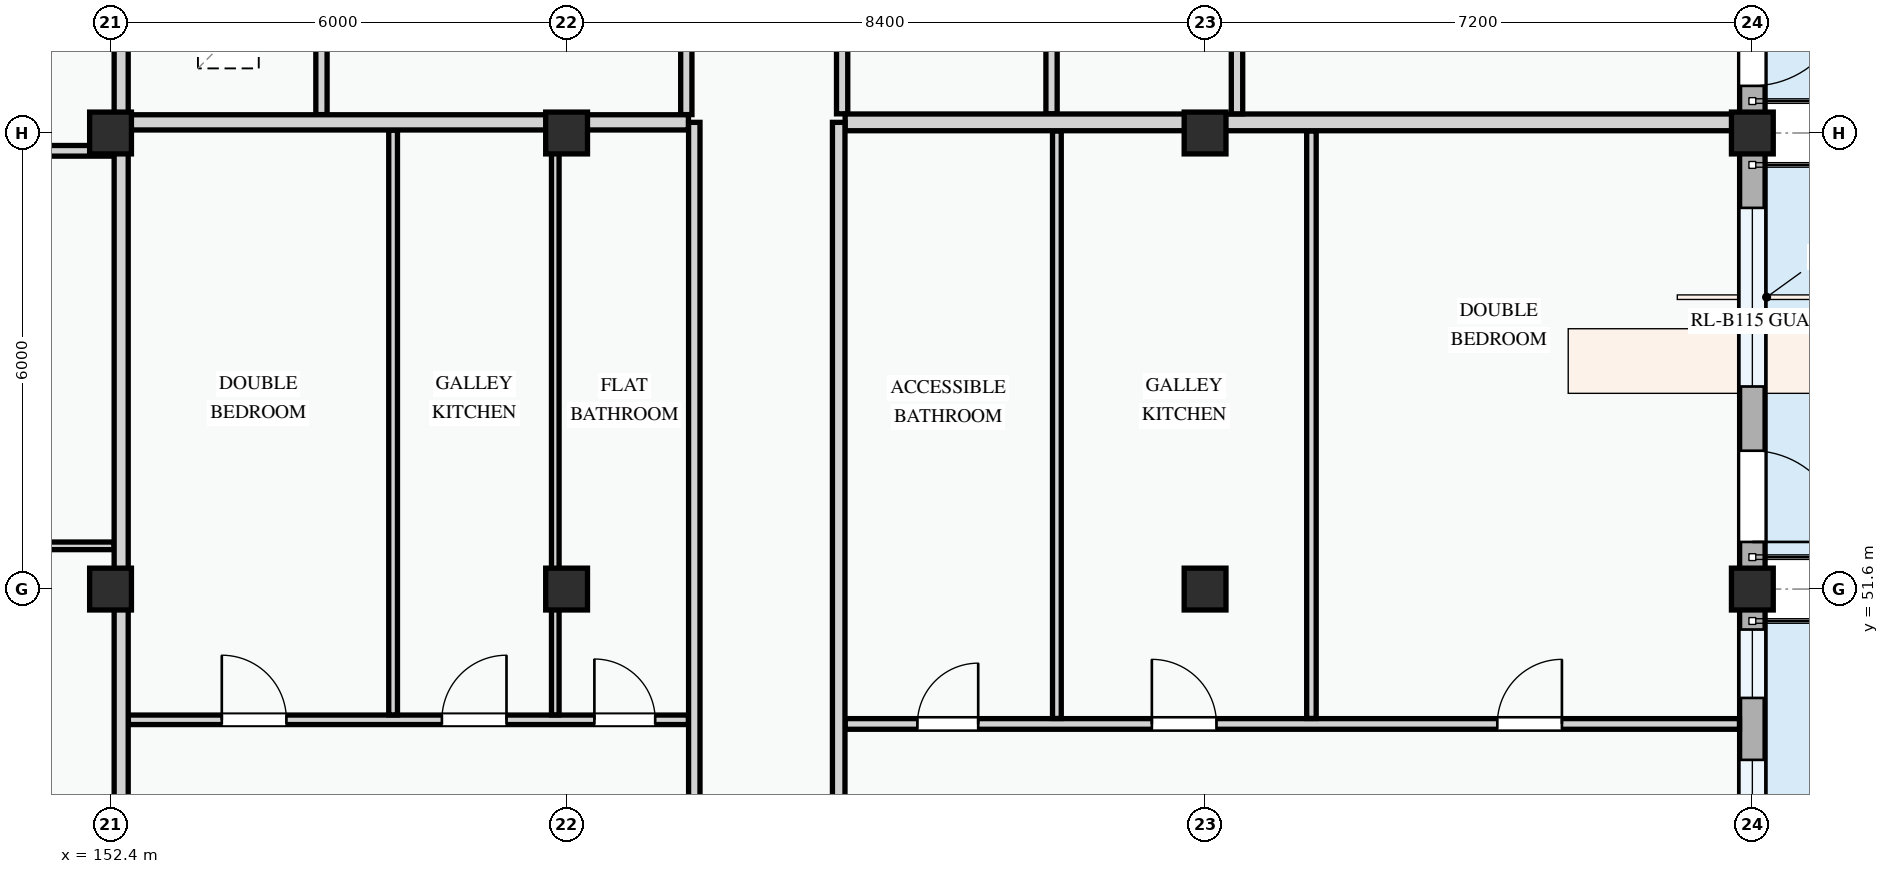
"""IFC4 building model, lengths in metres.
Left out: names, types, materials, properties, quantities, classifications, styles, units other than length and angle.
Written with IfcOpenShell. Run it as: python <this file> out.ifc"""

import sys

from ifc_helpers import new_model, si_unit, direction, frame, frame_2d, origin, origin_2d, place, context, subcontext, project, spatial, rectangle, extrude, element, fill, save


model = new_model("IFC4")
c1 = context("Model", 3, precision=1e-05, world=origin(), true_north=direction((0.0, 1.0)))
c2 = subcontext(c1, "Body", "Model", "MODEL_VIEW")
j1 = project(units=[si_unit("LENGTHUNIT", "METRE"), si_unit("PLANEANGLEUNIT", "RADIAN")], contexts=[c1])
p1 = place(None, origin())
s1 = spatial("IfcSite", under=j1, at=p1, CompositionType="ELEMENT")
p2 = place(p1, origin())
s2 = spatial("IfcBuilding", under=s1, at=p2, CompositionType="ELEMENT")
p3 = place(p2, frame((0.0, 0.0, 8.1)))
s3 = spatial("IfcBuildingStorey", under=s2, at=p3, CompositionType="ELEMENT", Elevation=8.1)
for number, where, z_axis, x_axis in (
    (1, (152.4, 51.6, 0.0), (0.0, 0.0, 1.0), (1.0, 0.0, 0.0)),
    (2, (152.4, 57.6, 0.0), (0.0, 0.0, 1.0), (1.0, 0.0, 0.0)),
    (3, (158.4, 51.6, 0.0), (0.0, 0.0, 1.0), (1.0, 0.0, 0.0)),
    (4, (158.4, 57.6, 0.0), (0.0, 0.0, 1.0), (1.0, 0.0, 0.0)),
    (5, (166.8, 51.6, 0.0), (0.0, 0.0, 1.0), (1.0, 0.0, 0.0)),
    (6, (166.8, 57.6, 0.0), (0.0, 0.0, 1.0), (1.0, 0.0, 0.0)),
    (7, (174.0, 51.6, 0.0), (0.0, 0.0, 1.0), (1.0, 0.0, 0.0)),
    (8, (174.0, 57.6, 0.0), (0.0, 0.0, 1.0), (1.0, 0.0, 0.0)),
):
    element("IfcColumn", number, at=place(p3, frame(where, z_axis=z_axis, x_axis=x_axis)), inside=s3, PredefinedType="COLUMN", context=c2, shape_type="SweptSolid", body=[
        extrude(rectangle(XDim=0.55, YDim=0.55, at=origin_2d()), origin(), (0.0, 0.0, 1.0), 3.3),
    ])
p4 = place(p3, frame((174.0, 43.2, 0.0), z_axis=(0.0, 0.0, 1.0), x_axis=(0.0, 1.0, 0.0)))
e9 = element("IfcWall", 9, at=p4, inside=s3, PredefinedType="STANDARD", context=c2, shape_type="SweptSolid", body=[
    extrude(rectangle(XDim=8.4, YDim=0.335, at=frame_2d((4.2, 0.0))), origin(), (0.0, 0.0, 1.0), 2.425),
])
p5 = place(p4, frame((2.15, 0.0, 0.0)))
e10 = element("IfcOpeningElement", 10, at=p5, cuts=e9, PredefinedType="OPENING", context=c2, shape_type="SweptSolid", body=[
    extrude(rectangle(XDim=1.1, YDim=2.15, at=frame_2d((0.55, 1.075))), frame((0.0, 0.177, 0.0), z_axis=(0.0, -1.0, 0.0), x_axis=(1.0, 0.0, 0.0)), (0.0, 0.0, 1.0), 0.355),
])
p6 = place(p4, frame((0.505, 0.0, 0.78)))
e11 = element("IfcOpeningElement", 11, at=p6, cuts=e9, PredefinedType="OPENING", context=c2, shape_type="SweptSolid", body=[
    extrude(rectangle(XDim=1.0, YDim=1.25, at=frame_2d((0.5, 0.625))), frame((0.0, 0.177, 0.0), z_axis=(0.0, -1.0, 0.0), x_axis=(1.0, 0.0, 0.0)), (0.0, 0.0, 1.0), 0.355),
])
p7 = place(p4, frame((3.773, 0.0, 0.78)))
e12 = element("IfcOpeningElement", 12, at=p7, cuts=e9, PredefinedType="OPENING", context=c2, shape_type="SweptSolid", body=[
    extrude(rectangle(XDim=2.38, YDim=1.48, at=frame_2d((1.19, 0.74))), frame((0.0, 0.177, 0.0), z_axis=(0.0, -1.0, 0.0), x_axis=(1.0, 0.0, 0.0)), (0.0, 0.0, 1.0), 0.355),
])
p8 = place(p4, frame((6.968, 0.0, 0.78)))
e13 = element("IfcOpeningElement", 13, at=p8, cuts=e9, PredefinedType="OPENING", context=c2, shape_type="SweptSolid", body=[
    extrude(rectangle(XDim=0.9, YDim=1.2, at=frame_2d((0.45, 0.6))), frame((0.0, 0.177, 0.0), z_axis=(0.0, -1.0, 0.0), x_axis=(1.0, 0.0, 0.0)), (0.0, 0.0, 1.0), 0.355),
])
p9 = place(p3, frame((174.0, 51.6, 0.0), z_axis=(0.0, 0.0, 1.0), x_axis=(0.0, 1.0, 0.0)))
e14 = element("IfcWall", 14, at=p9, inside=s3, PredefinedType="STANDARD", context=c2, shape_type="SweptSolid", body=[
    extrude(rectangle(XDim=6.0, YDim=0.335, at=frame_2d((3.0, 0.0))), origin(), (0.0, 0.0, 1.0), 2.575),
])
p10 = place(p9, frame((0.62, 0.0, 0.0)))
e15 = element("IfcOpeningElement", 15, at=p10, cuts=e14, PredefinedType="OPENING", context=c2, shape_type="SweptSolid", body=[
    extrude(rectangle(XDim=1.2, YDim=2.15, at=frame_2d((0.6, 1.075))), frame((0.0, 0.177, 0.0), z_axis=(0.0, -1.0, 0.0), x_axis=(1.0, 0.0, 0.0)), (0.0, 0.0, 1.0), 0.355),
])
p11 = place(p9, frame((2.665, 0.0, 0.78)))
e16 = element("IfcOpeningElement", 16, at=p11, cuts=e14, PredefinedType="OPENING", context=c2, shape_type="SweptSolid", body=[
    extrude(rectangle(XDim=2.35, YDim=1.55, at=frame_2d((1.175, 0.775))), frame((0.0, 0.177, 0.0), z_axis=(0.0, -1.0, 0.0), x_axis=(1.0, 0.0, 0.0)), (0.0, 0.0, 1.0), 0.355),
])
p12 = place(p3, frame((174.0, 57.6, 0.0), z_axis=(0.0, 0.0, 1.0), x_axis=(0.0, 1.0, 0.0)))
e17 = element("IfcWall", 17, at=p12, inside=s3, PredefinedType="STANDARD", context=c2, shape_type="SweptSolid", body=[
    extrude(rectangle(XDim=8.4, YDim=0.335, at=frame_2d((4.2, 0.0))), origin(), (0.0, 0.0, 1.0), 2.425),
])
p13 = place(p12, frame((0.62, 0.0, 0.0)))
e18 = element("IfcOpeningElement", 18, at=p13, cuts=e17, PredefinedType="OPENING", context=c2, shape_type="SweptSolid", body=[
    extrude(rectangle(XDim=1.25, YDim=2.2, at=frame_2d((0.625, 1.1))), frame((0.0, 0.177, 0.0), z_axis=(0.0, -1.0, 0.0), x_axis=(1.0, 0.0, 0.0)), (0.0, 0.0, 1.0), 0.355),
])
p14 = place(p12, frame((2.288, 0.0, 0.78)))
e19 = element("IfcOpeningElement", 19, at=p14, cuts=e17, PredefinedType="OPENING", context=c2, shape_type="SweptSolid", body=[
    extrude(rectangle(XDim=2.48, YDim=1.46, at=frame_2d((1.24, 0.73))), frame((0.0, 0.177, 0.0), z_axis=(0.0, -1.0, 0.0), x_axis=(1.0, 0.0, 0.0)), (0.0, 0.0, 1.0), 0.355),
])
p15 = place(p12, frame((6.002, 0.0, 0.78)))
e20 = element("IfcOpeningElement", 20, at=p15, cuts=e17, PredefinedType="OPENING", context=c2, shape_type="SweptSolid", body=[
    extrude(rectangle(XDim=1.2, YDim=1.5, at=frame_2d((0.6, 0.75))), frame((0.0, 0.177, 0.0), z_axis=(0.0, -1.0, 0.0), x_axis=(1.0, 0.0, 0.0)), (0.0, 0.0, 1.0), 0.355),
])
for number, where, z_axis, x_axis in (
    (21, (155.175, 61.724, 0.0), (0.0, 0.0, 1.0), (0.0, -1.0, 0.0)),
    (22, (159.975, 61.724, 0.0), (0.0, 0.0, 1.0), (0.0, -1.0, 0.0)),
):
    element("IfcWall", number, at=place(p3, frame(where, z_axis=z_axis, x_axis=x_axis)), inside=s3, PredefinedType="PARTITIONING", context=c2, shape_type="SweptSolid", body=[
        extrude(rectangle(XDim=3.882, YDim=0.148, at=frame_2d((1.941, 0.0))), origin(), (0.0, 0.0, 1.0), 3.0),
    ])
for number, where, z_axis, x_axis in (
    (23, (162.025, 61.724, 0.0), (0.0, 0.0, 1.0), (0.0, -1.0, 0.0)),
    (24, (164.78, 61.724, 0.0), (0.0, 0.0, 1.0), (0.0, -1.0, 0.0)),
):
    element("IfcWall", number, at=place(p3, frame(where, z_axis=z_axis, x_axis=x_axis)), inside=s3, PredefinedType="PARTITIONING", context=c2, shape_type="SweptSolid", body=[
        extrude(rectangle(XDim=3.872, YDim=0.148, at=frame_2d((1.936, 0.0))), origin(), (0.0, 0.0, 1.0), 3.0),
    ])
p16 = place(p3, frame((152.635, 49.88, 0.0), z_axis=(0.0, 0.0, 1.0), x_axis=(1.0, 0.0, 0.0)))
e25 = element("IfcWall", 25, at=p16, inside=s3, PredefinedType="PARTITIONING", context=c2, shape_type="SweptSolid", body=[
    extrude(rectangle(XDim=7.368, YDim=0.125, at=frame_2d((3.684, 0.0))), origin(), (0.0, 0.0, 1.0), 3.0),
])
p17 = place(p16, frame((1.229, 0.0, 0.0)))
e26 = element("IfcOpeningElement", 26, at=p17, cuts=e25, PredefinedType="OPENING", context=c2, shape_type="SweptSolid", body=[
    extrude(rectangle(XDim=0.85, YDim=2.1, at=frame_2d((0.425, 1.05))), frame((0.0, 0.073, 0.0), z_axis=(0.0, -1.0, 0.0), x_axis=(1.0, 0.0, 0.0)), (0.0, 0.0, 1.0), 0.145),
])
p18 = place(p16, frame((4.125, 0.0, 0.0)))
e27 = element("IfcOpeningElement", 27, at=p18, cuts=e25, PredefinedType="OPENING", context=c2, shape_type="SweptSolid", body=[
    extrude(rectangle(XDim=0.85, YDim=2.1, at=frame_2d((0.425, 1.05))), frame((0.0, 0.073, 0.0), z_axis=(0.0, -1.0, 0.0), x_axis=(1.0, 0.0, 0.0)), (0.0, 0.0, 1.0), 0.145),
])
p19 = place(p16, frame((6.131, 0.0, 0.0)))
e28 = element("IfcOpeningElement", 28, at=p19, cuts=e25, PredefinedType="OPENING", context=c2, shape_type="SweptSolid", body=[
    extrude(rectangle(XDim=0.8, YDim=2.1, at=frame_2d((0.4, 1.05))), frame((0.0, 0.073, 0.0), z_axis=(0.0, -1.0, 0.0), x_axis=(1.0, 0.0, 0.0)), (0.0, 0.0, 1.0), 0.145),
])
p20 = place(p3, frame((156.118, 49.945, 0.0), z_axis=(0.0, 0.0, 1.0), x_axis=(0.0, 1.0, 0.0)))
e29 = element("IfcWall", 29, at=p20, inside=s3, PredefinedType="PARTITIONING", context=c2, shape_type="SweptSolid", body=[
    extrude(rectangle(XDim=7.693, YDim=0.115, at=frame_2d((3.847, 0.0))), origin(), (0.0, 0.0, 1.0), 3.0),
])
p21 = place(p3, frame((158.251, 49.945, 0.0), z_axis=(0.0, 0.0, 1.0), x_axis=(0.0, 1.0, 0.0)))
e30 = element("IfcWall", 30, at=p21, inside=s3, PredefinedType="PARTITIONING", context=c2, shape_type="SweptSolid", body=[
    extrude(rectangle(XDim=7.693, YDim=0.1, at=frame_2d((3.847, 0.0))), origin(), (0.0, 0.0, 1.0), 2.425),
])
p22 = place(p3, frame((162.064, 49.826, 0.0), z_axis=(0.0, 0.0, 1.0), x_axis=(1.0, 0.0, 0.0)))
e31 = element("IfcWall", 31, at=p22, inside=s3, PredefinedType="PARTITIONING", context=c2, shape_type="SweptSolid", body=[
    extrude(rectangle(XDim=11.766, YDim=0.14, at=frame_2d((5.883, 0.0))), origin(), (0.0, 0.0, 1.0), 3.0),
])
p23 = place(p22, frame((0.951, 0.0, 0.0)))
e32 = element("IfcOpeningElement", 32, at=p23, cuts=e31, PredefinedType="OPENING", context=c2, shape_type="SweptSolid", body=[
    extrude(rectangle(XDim=0.8, YDim=2.1, at=frame_2d((0.4, 1.05))), frame((0.0, 0.08, 0.0), z_axis=(0.0, -1.0, 0.0), x_axis=(1.0, 0.0, 0.0)), (0.0, 0.0, 1.0), 0.16),
])
p24 = place(p22, frame((4.035, 0.0, 0.0)))
e33 = element("IfcOpeningElement", 33, at=p24, cuts=e31, PredefinedType="OPENING", context=c2, shape_type="SweptSolid", body=[
    extrude(rectangle(XDim=0.85, YDim=2.1, at=frame_2d((0.425, 1.05))), frame((0.0, 0.08, 0.0), z_axis=(0.0, -1.0, 0.0), x_axis=(1.0, 0.0, 0.0)), (0.0, 0.0, 1.0), 0.16),
])
p25 = place(p22, frame((8.58, 0.0, 0.0)))
e34 = element("IfcOpeningElement", 34, at=p25, cuts=e31, PredefinedType="OPENING", context=c2, shape_type="SweptSolid", body=[
    extrude(rectangle(XDim=0.85, YDim=2.1, at=frame_2d((0.425, 1.05))), frame((0.0, 0.08, 0.0), z_axis=(0.0, -1.0, 0.0), x_axis=(1.0, 0.0, 0.0)), (0.0, 0.0, 1.0), 0.16),
])
p26 = place(p3, frame((168.199, 49.898, 0.0), z_axis=(0.0, 0.0, 1.0), x_axis=(0.0, 1.0, 0.0)))
e35 = element("IfcWall", 35, at=p26, inside=s3, PredefinedType="PARTITIONING", context=c2, shape_type="SweptSolid", body=[
    extrude(rectangle(XDim=7.73, YDim=0.125, at=frame_2d((3.865, 0.0))), origin(), (0.0, 0.0, 1.0), 3.0),
])
p27 = place(p3, frame((164.85, 49.898, 0.0), z_axis=(0.0, 0.0, 1.0), x_axis=(0.0, 1.0, 0.0)))
e36 = element("IfcWall", 36, at=p27, inside=s3, PredefinedType="PARTITIONING", context=c2, shape_type="SweptSolid", body=[
    extrude(rectangle(XDim=7.73, YDim=0.115, at=frame_2d((3.865, 0.0))), origin(), (0.0, 0.0, 1.0), 3.0),
])
p28 = place(p3, frame((152.635, 57.74, 0.0), z_axis=(0.0, 0.0, 1.0), x_axis=(1.0, 0.0, 0.0)))
e37 = element("IfcWall", 37, at=p28, inside=s3, PredefinedType="PARTITIONING", context=c2, shape_type="SweptSolid", body=[
    extrude(rectangle(XDim=7.368, YDim=0.2, at=frame_2d((3.684, 0.0))), origin(), (0.0, 0.0, 1.0), 2.375),
])
p29 = place(p3, frame((162.064, 57.74, 0.0), z_axis=(0.0, 0.0, 1.0), x_axis=(1.0, 0.0, 0.0)))
e38 = element("IfcWall", 38, at=p29, inside=s3, PredefinedType="PARTITIONING", context=c2, shape_type="SweptSolid", body=[
    extrude(rectangle(XDim=11.766, YDim=0.22, at=frame_2d((5.883, 0.0))), origin(), (0.0, 0.0, 1.0), 2.375),
])
p30 = place(p3, frame((160.08, 37.369, 0.0), z_axis=(0.0, 0.0, 1.0), x_axis=(0.0, 1.0, 0.0)))
e39 = element("IfcWall", 39, at=p30, inside=s3, PredefinedType="PARTITIONING", context=c2, shape_type="SweptSolid", body=[
    extrude(rectangle(XDim=20.371, YDim=0.15, at=frame_2d((10.185, 0.0))), origin(), (0.0, 0.0, 1.0), 3.0),
])
p31 = place(p30, frame((2.333, 0.0, 0.0)))
e40 = element("IfcOpeningElement", 40, at=p31, cuts=e39, PredefinedType="OPENING", context=c2, shape_type="SweptSolid", body=[
    extrude(rectangle(XDim=0.92, YDim=2.1, at=frame_2d((0.46, 1.05))), frame((0.0, 0.085, 0.0), z_axis=(0.0, -1.0, 0.0), x_axis=(1.0, 0.0, 0.0)), (0.0, 0.0, 1.0), 0.17),
])
p32 = place(p30, frame((9.601, 0.0, 0.0)))
e41 = element("IfcOpeningElement", 41, at=p32, cuts=e39, PredefinedType="OPENING", context=c2, shape_type="SweptSolid", body=[
    extrude(rectangle(XDim=0.92, YDim=2.1, at=frame_2d((0.46, 1.05))), frame((0.0, 0.085, 0.0), z_axis=(0.0, -1.0, 0.0), x_axis=(1.0, 0.0, 0.0)), (0.0, 0.0, 1.0), 0.17),
])
p33 = place(p3, frame((161.98, 37.369, 0.0), z_axis=(0.0, 0.0, 1.0), x_axis=(0.0, 1.0, 0.0)))
e42 = element("IfcWall", 42, at=p33, inside=s3, PredefinedType="PARTITIONING", context=c2, shape_type="SweptSolid", body=[
    extrude(rectangle(XDim=20.371, YDim=0.165, at=frame_2d((10.185, 0.0))), origin(), (0.0, 0.0, 1.0), 3.0),
])
p34 = place(p33, frame((2.334, 0.0, 0.0)))
e43 = element("IfcOpeningElement", 43, at=p34, cuts=e42, PredefinedType="OPENING", context=c2, shape_type="SweptSolid", body=[
    extrude(rectangle(XDim=0.92, YDim=2.1, at=frame_2d((0.46, 1.05))), frame((0.0, 0.093, 0.0), z_axis=(0.0, -1.0, 0.0), x_axis=(1.0, 0.0, 0.0)), (0.0, 0.0, 1.0), 0.185),
])
p35 = place(p33, frame((9.573, 0.0, 0.0)))
e44 = element("IfcOpeningElement", 44, at=p35, cuts=e42, PredefinedType="OPENING", context=c2, shape_type="SweptSolid", body=[
    extrude(rectangle(XDim=0.96, YDim=2.12, at=frame_2d((0.48, 1.06))), frame((0.0, 0.093, 0.0), z_axis=(0.0, -1.0, 0.0), x_axis=(1.0, 0.0, 0.0)), (0.0, 0.0, 1.0), 0.185),
])
p36 = place(p3, frame((167.22, 57.852, 0.0), z_axis=(0.0, 0.0, 1.0), x_axis=(0.0, 1.0, 0.0)))
e45 = element("IfcWall", 45, at=p36, inside=s3, PredefinedType="PARTITIONING", context=c2, shape_type="SweptSolid", body=[
    extrude(rectangle(XDim=13.979, YDim=0.15, at=frame_2d((6.989, 0.0))), origin(), (0.0, 0.0, 1.0), 2.425),
])
p37 = place(p36, frame((2.438, 0.0, 0.0)))
e46 = element("IfcOpeningElement", 46, at=p37, cuts=e45, PredefinedType="OPENING", context=c2, shape_type="SweptSolid", body=[
    extrude(rectangle(XDim=0.92, YDim=2.1, at=frame_2d((0.46, 1.05))), frame((0.0, 0.085, 0.0), z_axis=(0.0, -1.0, 0.0), x_axis=(1.0, 0.0, 0.0)), (0.0, 0.0, 1.0), 0.17),
])
p38 = place(p3, frame((145.86, 52.169, 0.0), z_axis=(0.0, 0.0, 1.0), x_axis=(1.0, 0.0, 0.0)))
e47 = element("IfcWall", 47, at=p38, inside=s3, PredefinedType="PARTITIONING", context=c2, shape_type="SweptSolid", body=[
    extrude(rectangle(XDim=6.586, YDim=0.1, at=frame_2d((3.293, 0.0))), origin(), (0.0, 0.0, 1.0), 3.0),
])
p39 = place(p3, frame((145.86, 57.365, 0.0), z_axis=(0.0, 0.0, 1.0), x_axis=(1.0, 0.0, 0.0)))
e48 = element("IfcWall", 48, at=p39, inside=s3, PredefinedType="PARTITIONING", context=c2, shape_type="SweptSolid", body=[
    extrude(rectangle(XDim=6.586, YDim=0.14, at=frame_2d((3.293, 0.0))), origin(), (0.0, 0.0, 1.0), 2.375),
])
p40 = place(p3, frame((152.54, 43.26, 0.0), z_axis=(0.0, 0.0, 1.0), x_axis=(0.0, 1.0, 0.0)))
e49 = element("IfcWall", 49, at=p40, inside=s3, PredefinedType="PARTITIONING", context=c2, shape_type="SweptSolid", body=[
    extrude(rectangle(XDim=18.464, YDim=0.185, at=frame_2d((9.232, 0.0))), origin(), (0.0, 0.0, 1.0), 2.425),
])
p41 = place(p7, origin())
e50 = element("IfcWindow", 50, at=p41, inside=s3, PartitioningType="DOUBLE_PANEL_VERTICAL", PredefinedType="WINDOW", context=c2, shape_type="SweptSolid", body=[
    extrude(rectangle(XDim=2.38, YDim=1.48, at=frame_2d((1.19, 0.74))), frame((0.0, 0.03, 0.0), z_axis=(0.0, -1.0, 0.0), x_axis=(1.0, 0.0, 0.0)), (0.0, 0.0, 1.0), 0.06),
])
fill(e12, e50)
p42 = place(p8, origin())
e51 = element("IfcWindow", 51, at=p42, inside=s3, PartitioningType="SINGLE_PANEL", PredefinedType="WINDOW", context=c2, shape_type="SweptSolid", body=[
    extrude(rectangle(XDim=0.9, YDim=1.2, at=frame_2d((0.45, 0.6))), frame((0.0, 0.03, 0.0), z_axis=(0.0, -1.0, 0.0), x_axis=(1.0, 0.0, 0.0)), (0.0, 0.0, 1.0), 0.06),
])
fill(e13, e51)
p43 = place(p10, frame((1.2, 0.0, 0.0), z_axis=(0.0, 0.0, 1.0), x_axis=(-1.0, 0.0, 0.0)))
e52 = element("IfcDoor", 52, at=p43, inside=s3, OperationType="SINGLE_SWING_RIGHT", PredefinedType="DOOR", context=c2, shape_type="SweptSolid", body=[
    extrude(rectangle(XDim=1.2, YDim=2.15, at=frame_2d((0.6, 1.075))), frame((0.0, 0.025, 0.0), z_axis=(0.0, -1.0, 0.0), x_axis=(1.0, 0.0, 0.0)), (0.0, 0.0, 1.0), 0.05),
])
fill(e15, e52)
p44 = place(p11, origin())
e53 = element("IfcWindow", 53, at=p44, inside=s3, PartitioningType="DOUBLE_PANEL_VERTICAL", PredefinedType="WINDOW", context=c2, shape_type="SweptSolid", body=[
    extrude(rectangle(XDim=2.35, YDim=1.55, at=frame_2d((1.175, 0.775))), frame((0.0, 0.03, 0.0), z_axis=(0.0, -1.0, 0.0), x_axis=(1.0, 0.0, 0.0)), (0.0, 0.0, 1.0), 0.06),
])
fill(e16, e53)
p45 = place(p13, frame((1.25, 0.0, 0.0), z_axis=(0.0, 0.0, 1.0), x_axis=(-1.0, 0.0, 0.0)))
e54 = element("IfcDoor", 54, at=p45, inside=s3, OperationType="SINGLE_SWING_LEFT", PredefinedType="DOOR", context=c2, shape_type="SweptSolid", body=[
    extrude(rectangle(XDim=1.25, YDim=2.2, at=frame_2d((0.625, 1.1))), frame((0.0, 0.025, 0.0), z_axis=(0.0, -1.0, 0.0), x_axis=(1.0, 0.0, 0.0)), (0.0, 0.0, 1.0), 0.05),
])
fill(e18, e54)
p46 = place(p17, origin())
e55 = element("IfcDoor", 55, at=p46, inside=s3, OperationType="SINGLE_SWING_LEFT", PredefinedType="DOOR", context=c2, shape_type="SweptSolid", body=[
    extrude(rectangle(XDim=0.85, YDim=2.1, at=frame_2d((0.425, 1.05))), frame((0.0, 0.025, 0.0), z_axis=(0.0, -1.0, 0.0), x_axis=(1.0, 0.0, 0.0)), (0.0, 0.0, 1.0), 0.05),
])
fill(e26, e55)
p47 = place(p18, origin())
e56 = element("IfcDoor", 56, at=p47, inside=s3, OperationType="SINGLE_SWING_RIGHT", PredefinedType="DOOR", context=c2, shape_type="SweptSolid", body=[
    extrude(rectangle(XDim=0.85, YDim=2.1, at=frame_2d((0.425, 1.05))), frame((0.0, 0.025, 0.0), z_axis=(0.0, -1.0, 0.0), x_axis=(1.0, 0.0, 0.0)), (0.0, 0.0, 1.0), 0.05),
])
fill(e27, e56)
p48 = place(p19, origin())
e57 = element("IfcDoor", 57, at=p48, inside=s3, OperationType="SINGLE_SWING_LEFT", PredefinedType="DOOR", context=c2, shape_type="SweptSolid", body=[
    extrude(rectangle(XDim=0.8, YDim=2.1, at=frame_2d((0.4, 1.05))), frame((0.0, 0.025, 0.0), z_axis=(0.0, -1.0, 0.0), x_axis=(1.0, 0.0, 0.0)), (0.0, 0.0, 1.0), 0.05),
])
fill(e28, e57)
p49 = place(p23, origin())
e58 = element("IfcDoor", 58, at=p49, inside=s3, OperationType="SINGLE_SWING_RIGHT", PredefinedType="DOOR", context=c2, shape_type="SweptSolid", body=[
    extrude(rectangle(XDim=0.8, YDim=2.1, at=frame_2d((0.4, 1.05))), frame((0.0, 0.025, 0.0), z_axis=(0.0, -1.0, 0.0), x_axis=(1.0, 0.0, 0.0)), (0.0, 0.0, 1.0), 0.05),
])
fill(e32, e58)
p50 = place(p24, origin())
e59 = element("IfcDoor", 59, at=p50, inside=s3, OperationType="SINGLE_SWING_LEFT", PredefinedType="DOOR", context=c2, shape_type="SweptSolid", body=[
    extrude(rectangle(XDim=0.85, YDim=2.1, at=frame_2d((0.425, 1.05))), frame((0.0, 0.025, 0.0), z_axis=(0.0, -1.0, 0.0), x_axis=(1.0, 0.0, 0.0)), (0.0, 0.0, 1.0), 0.05),
])
fill(e33, e59)
p51 = place(p25, origin())
e60 = element("IfcDoor", 60, at=p51, inside=s3, OperationType="SINGLE_SWING_RIGHT", PredefinedType="DOOR", context=c2, shape_type="SweptSolid", body=[
    extrude(rectangle(XDim=0.85, YDim=2.1, at=frame_2d((0.425, 1.05))), frame((0.0, 0.025, 0.0), z_axis=(0.0, -1.0, 0.0), x_axis=(1.0, 0.0, 0.0)), (0.0, 0.0, 1.0), 0.05),
])
fill(e34, e60)
save(model, sys.argv[1])
